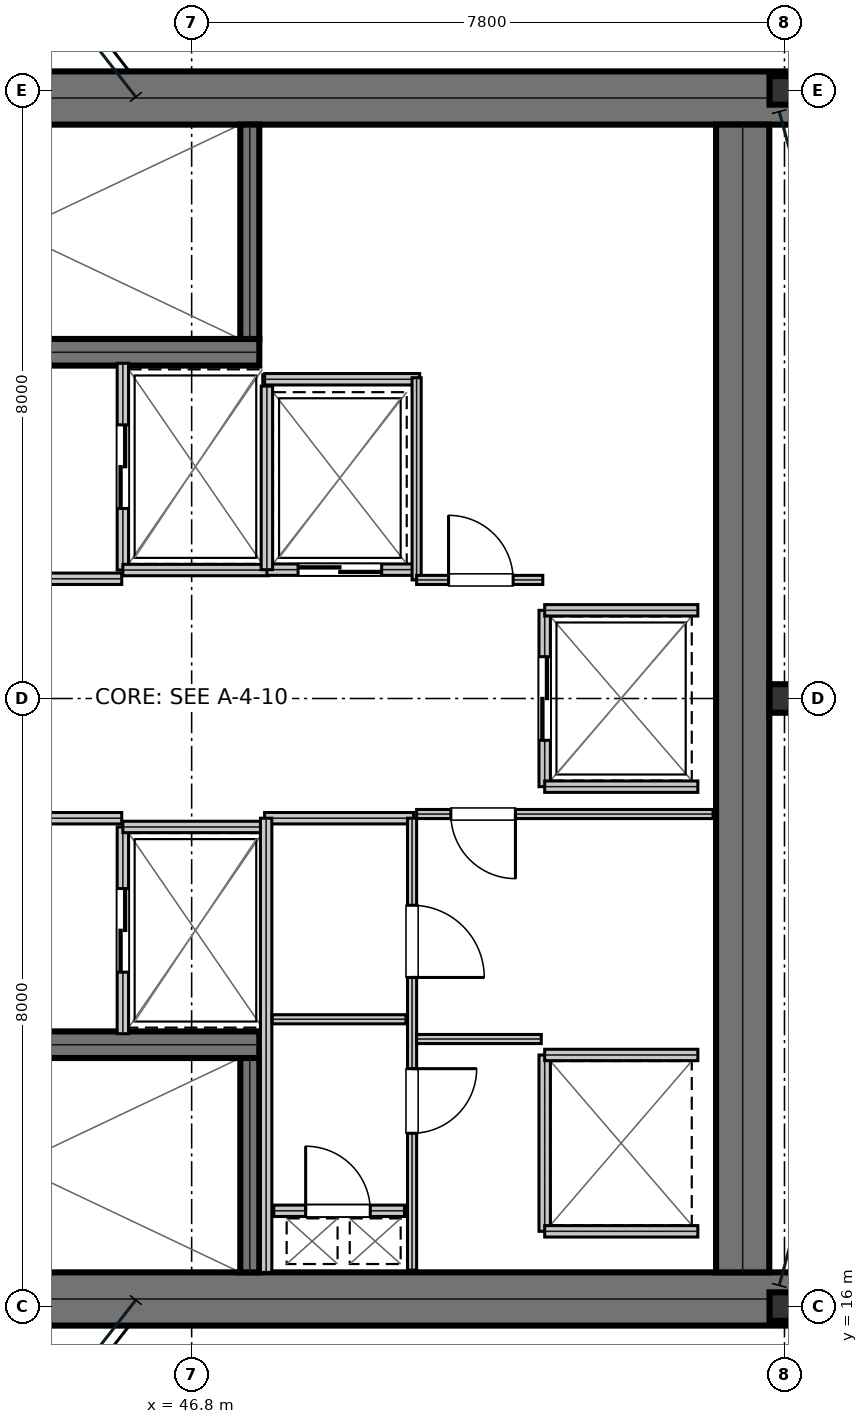
"""IFC4 building model, lengths in metres.
Left out: names, types, materials, properties, quantities, classifications, styles, units other than length and angle.
Written with IfcOpenShell. Run it as: python <this file> out.ifc"""

import sys

from ifc_helpers import new_model, si_unit, direction, frame, frame_2d, origin, origin_2d, place, context, subcontext, project, spatial, rectangle, i_section, extrude, element, fill, save


model = new_model("IFC4")
c1 = context("Model", 3, precision=1e-05, world=origin(), true_north=direction((0.0, 1.0)))
c2 = subcontext(c1, "Body", "Model", "MODEL_VIEW")
j1 = project(units=[si_unit("LENGTHUNIT", "METRE"), si_unit("PLANEANGLEUNIT", "RADIAN")], contexts=[c1])
p1 = place(None, origin())
s1 = spatial("IfcSite", under=j1, at=p1, CompositionType="ELEMENT")
p2 = place(p1, origin())
s2 = spatial("IfcBuilding", under=s1, at=p2, CompositionType="ELEMENT")
p3 = place(p2, frame((0.0, 0.0, 248.55)))
s3 = spatial("IfcBuildingStorey", under=s2, at=p3, CompositionType="ELEMENT", Elevation=248.55)
for number, where, z_axis, x_axis in (
    (1, (38.8, 31.9, 0.0), (0.0, 0.0, 1.0), (1.0, 0.0, 0.0)),
    (2, (38.8, 16.1, 0.0), (0.0, 0.0, 1.0), (1.0, 0.0, 0.0)),
):
    element("IfcWall", number, at=place(p3, frame(where, z_axis=z_axis, x_axis=x_axis)), inside=s3, PredefinedType="SHEAR", context=c2, shape_type="SweptSolid", body=[
        extrude(rectangle(XDim=16.0, YDim=0.7, at=frame_2d((8.0, 0.0))), origin(), (0.0, 0.0, 1.0), 3.79),
    ])
p4 = place(p3, frame((54.05, 16.45, 0.0), z_axis=(0.0, 0.0, 1.0), x_axis=(0.0, 1.0, 0.0)))
e3 = element("IfcWall", 3, at=p4, inside=s3, PredefinedType="SHEAR", context=c2, shape_type="SweptSolid", body=[
    extrude(rectangle(XDim=15.1, YDim=0.7, at=frame_2d((7.55, 0.0))), origin(), (0.0, 0.0, 1.0), 3.79),
])
p5 = place(p3, frame((39.98, 28.555, 0.0), z_axis=(0.0, 0.0, 1.0), x_axis=(1.0, 0.0, 0.0)))
e4 = element("IfcWall", 4, at=p5, inside=s3, PredefinedType="SHEAR", context=c2, shape_type="SweptSolid", body=[
    extrude(rectangle(XDim=7.71, YDim=0.35, at=frame_2d((3.855, 0.0))), origin(), (0.0, 0.0, 1.0), 3.79),
])
p6 = place(p5, frame((0.25, 0.0, 0.0)))
e5 = element("IfcOpeningElement", 5, at=p6, cuts=e4, PredefinedType="OPENING", context=c2, shape_type="SweptSolid", body=[
    extrude(rectangle(XDim=1.1, YDim=2.15, at=frame_2d((0.55, 1.075))), frame((0.0, 0.185, 0.0), z_axis=(0.0, -1.0, 0.0), x_axis=(1.0, 0.0, 0.0)), (0.0, 0.0, 1.0), 0.37),
])
p7 = place(p3, frame((39.98, 19.445, 0.0), z_axis=(0.0, 0.0, 1.0), x_axis=(1.0, 0.0, 0.0)))
e6 = element("IfcWall", 6, at=p7, inside=s3, PredefinedType="SHEAR", context=c2, shape_type="SweptSolid", body=[
    extrude(rectangle(XDim=7.71, YDim=0.35, at=frame_2d((3.855, 0.0))), origin(), (0.0, 0.0, 1.0), 3.79),
])
p8 = place(p7, frame((0.25, 0.0, 0.0)))
e7 = element("IfcOpeningElement", 7, at=p8, cuts=e6, PredefinedType="OPENING", context=c2, shape_type="SweptSolid", body=[
    extrude(rectangle(XDim=1.1, YDim=2.15, at=frame_2d((0.55, 1.075))), frame((0.0, 0.185, 0.0), z_axis=(0.0, -1.0, 0.0), x_axis=(1.0, 0.0, 0.0)), (0.0, 0.0, 1.0), 0.37),
])
for number, where, z_axis, x_axis in (
    (8, (47.565, 28.73, 0.0), (0.0, 0.0, 1.0), (0.0, 1.0, 0.0)),
    (9, (47.565, 16.45, 0.0), (0.0, 0.0, 1.0), (0.0, 1.0, 0.0)),
):
    element("IfcWall", number, at=place(p3, frame(where, z_axis=z_axis, x_axis=x_axis)), inside=s3, PredefinedType="SHEAR", context=c2, shape_type="SweptSolid", body=[
        extrude(rectangle(XDim=2.82, YDim=0.25, at=frame_2d((1.41, 0.0))), origin(), (0.0, 0.0, 1.0), 3.79),
    ])
for number, where, z_axis, x_axis in (
    (10, (54.6, 16.0, 0.0), (0.0, 0.0, 1.0), (1.0, 0.0, 0.0)),
    (11, (54.6, 24.0, 0.0), (0.0, 0.0, 1.0), (1.0, 0.0, 0.0)),
    (12, (54.6, 32.0, 0.0), (0.0, 0.0, 1.0), (1.0, 0.0, 0.0)),
):
    element("IfcColumn", number, at=place(p3, frame(where, z_axis=z_axis, x_axis=x_axis)), inside=s3, PredefinedType="COLUMN", context=c2, shape_type="SweptSolid", body=[
        extrude(i_section(OverallWidth=0.394, OverallDepth=0.375, WebThickness=0.017, FlangeThickness=0.028, at=origin_2d()), origin(), (0.0, 0.0, 1.0), 4.044),
    ])
p9 = place(p3, frame((39.98, 25.575, 0.0), z_axis=(0.0, 0.0, 1.0), x_axis=(1.0, 0.0, 0.0)))
e13 = element("IfcWall", 13, at=p9, inside=s3, PredefinedType="PARTITIONING", context=c2, shape_type="SweptSolid", body=[
    extrude(rectangle(XDim=5.9, YDim=0.15, at=frame_2d((2.95, 0.0))), origin(), (0.0, 0.0, 1.0), 3.79),
])
p10 = place(p9, frame((2.35, 0.0, 0.0)))
e14 = element("IfcOpeningElement", 14, at=p10, cuts=e13, PredefinedType="OPENING", context=c2, shape_type="SweptSolid", body=[
    extrude(rectangle(XDim=1.05, YDim=2.15, at=frame_2d((0.525, 1.075))), frame((0.0, 0.085, 0.0), z_axis=(0.0, -1.0, 0.0), x_axis=(1.0, 0.0, 0.0)), (0.0, 0.0, 1.0), 0.17),
])
p11 = place(p3, frame((39.98, 22.425, 0.0), z_axis=(0.0, 0.0, 1.0), x_axis=(1.0, 0.0, 0.0)))
e15 = element("IfcWall", 15, at=p11, inside=s3, PredefinedType="PARTITIONING", context=c2, shape_type="SweptSolid", body=[
    extrude(rectangle(XDim=5.9, YDim=0.15, at=frame_2d((2.95, 0.0))), origin(), (0.0, 0.0, 1.0), 3.79),
])
p12 = place(p11, frame((2.35, 0.0, 0.0)))
e16 = element("IfcOpeningElement", 16, at=p12, cuts=e15, PredefinedType="OPENING", context=c2, shape_type="SweptSolid", body=[
    extrude(rectangle(XDim=1.05, YDim=2.15, at=frame_2d((0.525, 1.075))), frame((0.0, 0.085, 0.0), z_axis=(0.0, -1.0, 0.0), x_axis=(1.0, 0.0, 0.0)), (0.0, 0.0, 1.0), 0.17),
])
p13 = place(p3, frame((45.895, 25.69, 0.0), z_axis=(0.0, 0.0, 1.0), x_axis=(0.0, 1.0, 0.0)))
e17 = element("IfcWall", 17, at=p13, inside=s3, PredefinedType="PARTITIONING", context=c2, shape_type="SweptSolid", body=[
    extrude(rectangle(XDim=2.72, YDim=0.15, at=frame_2d((1.36, 0.0))), origin(), (0.0, 0.0, 1.0), 3.79),
])
p14 = place(p13, frame((0.81, 0.0, 0.0)))
e18 = element("IfcOpeningElement", 18, at=p14, cuts=e17, PredefinedType="OPENING", context=c2, shape_type="SweptSolid", body=[
    extrude(rectangle(XDim=1.1, YDim=2.15, at=frame_2d((0.55, 1.075))), frame((0.0, 0.085, 0.0), z_axis=(0.0, -1.0, 0.0), x_axis=(1.0, 0.0, 0.0)), (0.0, 0.0, 1.0), 0.17),
])
p15 = place(p3, frame((45.895, 25.69, 0.0), z_axis=(0.0, 0.0, 1.0), x_axis=(1.0, 0.0, 0.0)))
e19 = element("IfcWall", 19, at=p15, inside=s3, PredefinedType="PARTITIONING", context=c2, shape_type="SweptSolid", body=[
    extrude(rectangle(XDim=1.915, YDim=0.15, at=frame_2d((0.958, 0.0))), origin(), (0.0, 0.0, 1.0), 3.79),
])
p16 = place(p3, frame((45.895, 19.59, 0.0), z_axis=(0.0, 0.0, 1.0), x_axis=(0.0, 1.0, 0.0)))
e20 = element("IfcWall", 20, at=p16, inside=s3, PredefinedType="PARTITIONING", context=c2, shape_type="SweptSolid", body=[
    extrude(rectangle(XDim=2.72, YDim=0.15, at=frame_2d((1.36, 0.0))), origin(), (0.0, 0.0, 1.0), 3.79),
])
p17 = place(p16, frame((0.81, 0.0, 0.0)))
e21 = element("IfcOpeningElement", 21, at=p17, cuts=e20, PredefinedType="OPENING", context=c2, shape_type="SweptSolid", body=[
    extrude(rectangle(XDim=1.1, YDim=2.15, at=frame_2d((0.55, 1.075))), frame((0.0, 0.085, 0.0), z_axis=(0.0, -1.0, 0.0), x_axis=(1.0, 0.0, 0.0)), (0.0, 0.0, 1.0), 0.17),
])
p18 = place(p3, frame((45.895, 22.31, 0.0), z_axis=(0.0, 0.0, 1.0), x_axis=(1.0, 0.0, 0.0)))
e22 = element("IfcWall", 22, at=p18, inside=s3, PredefinedType="PARTITIONING", context=c2, shape_type="SweptSolid", body=[
    extrude(rectangle(XDim=1.915, YDim=0.15, at=frame_2d((0.958, 0.0))), origin(), (0.0, 0.0, 1.0), 3.79),
])
p19 = place(p3, frame((47.79, 25.695, 0.0), z_axis=(0.0, 0.0, 1.0), x_axis=(1.0, 0.0, 0.0)))
e23 = element("IfcWall", 23, at=p19, inside=s3, PredefinedType="PARTITIONING", context=c2, shape_type="SweptSolid", body=[
    extrude(rectangle(XDim=1.92, YDim=0.15, at=frame_2d((0.96, 0.0))), origin(), (0.0, 0.0, 1.0), 3.79),
])
p20 = place(p19, frame((0.41, 0.0, 0.0)))
e24 = element("IfcOpeningElement", 24, at=p20, cuts=e23, PredefinedType="OPENING", context=c2, shape_type="SweptSolid", body=[
    extrude(rectangle(XDim=1.1, YDim=2.15, at=frame_2d((0.55, 1.075))), frame((0.0, 0.085, 0.0), z_axis=(0.0, -1.0, 0.0), x_axis=(1.0, 0.0, 0.0)), (0.0, 0.0, 1.0), 0.17),
])
p21 = place(p3, frame((47.79, 25.695, 0.0), z_axis=(0.0, 0.0, 1.0), x_axis=(0.0, 1.0, 0.0)))
e25 = element("IfcWall", 25, at=p21, inside=s3, PredefinedType="PARTITIONING", context=c2, shape_type="SweptSolid", body=[
    extrude(rectangle(XDim=2.415, YDim=0.15, at=frame_2d((1.208, 0.0))), origin(), (0.0, 0.0, 1.0), 3.79),
])
p22 = place(p3, frame((51.445, 22.84, 0.0), z_axis=(0.0, 0.0, 1.0), x_axis=(0.0, 1.0, 0.0)))
e26 = element("IfcWall", 26, at=p22, inside=s3, PredefinedType="PARTITIONING", context=c2, shape_type="SweptSolid", body=[
    extrude(rectangle(XDim=2.32, YDim=0.15, at=frame_2d((1.16, 0.0))), origin(), (0.0, 0.0, 1.0), 3.79),
])
p23 = place(p22, frame((0.61, 0.0, 0.0)))
e27 = element("IfcOpeningElement", 27, at=p23, cuts=e26, PredefinedType="OPENING", context=c2, shape_type="SweptSolid", body=[
    extrude(rectangle(XDim=1.1, YDim=2.15, at=frame_2d((0.55, 1.075))), frame((0.0, 0.085, 0.0), z_axis=(0.0, -1.0, 0.0), x_axis=(1.0, 0.0, 0.0)), (0.0, 0.0, 1.0), 0.17),
])
for number, where, z_axis, x_axis in (
    (28, (51.445, 22.84, 0.0), (0.0, 0.0, 1.0), (1.0, 0.0, 0.0)),
    (29, (51.445, 25.16, 0.0), (0.0, 0.0, 1.0), (1.0, 0.0, 0.0)),
):
    element("IfcWall", number, at=place(p3, frame(where, z_axis=z_axis, x_axis=x_axis)), inside=s3, PredefinedType="PARTITIONING", context=c2, shape_type="SweptSolid", body=[
        extrude(rectangle(XDim=2.015, YDim=0.15, at=frame_2d((1.007, 0.0))), origin(), (0.0, 0.0, 1.0), 3.79),
    ])
p24 = place(p3, frame((51.445, 16.99, 0.0), z_axis=(0.0, 0.0, 1.0), x_axis=(0.0, 1.0, 0.0)))
e30 = element("IfcWall", 30, at=p24, inside=s3, PredefinedType="PARTITIONING", context=c2, shape_type="SweptSolid", body=[
    extrude(rectangle(XDim=2.32, YDim=0.15, at=frame_2d((1.16, 0.0))), origin(), (0.0, 0.0, 1.0), 3.79),
])
for number, where, z_axis, x_axis in (
    (31, (51.445, 16.99, 0.0), (0.0, 0.0, 1.0), (1.0, 0.0, 0.0)),
    (32, (51.445, 19.31, 0.0), (0.0, 0.0, 1.0), (1.0, 0.0, 0.0)),
):
    element("IfcWall", number, at=place(p3, frame(where, z_axis=z_axis, x_axis=x_axis)), inside=s3, PredefinedType="PARTITIONING", context=c2, shape_type="SweptSolid", body=[
        extrude(rectangle(XDim=2.015, YDim=0.15, at=frame_2d((1.007, 0.0))), origin(), (0.0, 0.0, 1.0), 3.79),
    ])
p25 = place(p3, frame((47.88, 17.26, 0.0), z_axis=(0.0, 0.0, 1.0), x_axis=(1.0, 0.0, 0.0)))
e33 = element("IfcWall", 33, at=p25, inside=s3, PredefinedType="PARTITIONING", context=c2, shape_type="SweptSolid", body=[
    extrude(rectangle(XDim=1.72, YDim=0.15, at=frame_2d((0.86, 0.0))), origin(), (0.0, 0.0, 1.0), 3.79),
])
p26 = place(p25, frame((0.42, 0.0, 0.0)))
e34 = element("IfcOpeningElement", 34, at=p26, cuts=e33, PredefinedType="OPENING", context=c2, shape_type="SweptSolid", body=[
    extrude(rectangle(XDim=0.85, YDim=2.15, at=frame_2d((0.425, 1.075))), frame((0.0, 0.085, 0.0), z_axis=(0.0, -1.0, 0.0), x_axis=(1.0, 0.0, 0.0)), (0.0, 0.0, 1.0), 0.17),
])
p27 = place(p3, frame((47.76, 22.425, 0.0), z_axis=(0.0, 0.0, 1.0), x_axis=(1.0, 0.0, 0.0)))
e35 = element("IfcWall", 35, at=p27, inside=s3, PredefinedType="PARTITIONING", context=c2, shape_type="SweptSolid", body=[
    extrude(rectangle(XDim=1.96, YDim=0.15, at=frame_2d((0.98, 0.0))), origin(), (0.0, 0.0, 1.0), 3.79),
])
p28 = place(p3, frame((47.78, 16.45, 0.0), z_axis=(0.0, 0.0, 1.0), x_axis=(0.0, 1.0, 0.0)))
e36 = element("IfcWall", 36, at=p28, inside=s3, PredefinedType="PARTITIONING", context=c2, shape_type="SweptSolid", body=[
    extrude(rectangle(XDim=5.975, YDim=0.15, at=frame_2d((2.988, 0.0))), origin(), (0.0, 0.0, 1.0), 3.79),
])
p29 = place(p3, frame((47.86, 19.78, 0.0), z_axis=(0.0, 0.0, 1.0), x_axis=(1.0, 0.0, 0.0)))
e37 = element("IfcWall", 37, at=p29, inside=s3, PredefinedType="PARTITIONING", context=c2, shape_type="SweptSolid", body=[
    extrude(rectangle(XDim=1.76, YDim=0.12, at=frame_2d((0.88, 0.0))), origin(), (0.0, 0.0, 1.0), 3.79),
])
p30 = place(p3, frame((49.7, 16.48, 0.0), z_axis=(0.0, 0.0, 1.0), x_axis=(0.0, 1.0, 0.0)))
e38 = element("IfcWall", 38, at=p30, inside=s3, PredefinedType="PARTITIONING", context=c2, shape_type="SweptSolid", body=[
    extrude(rectangle(XDim=5.945, YDim=0.12, at=frame_2d((2.973, 0.0))), origin(), (0.0, 0.0, 1.0), 3.79),
])
p31 = place(p30, frame((1.8, 0.0, 0.0)))
e39 = element("IfcOpeningElement", 39, at=p31, cuts=e38, PredefinedType="OPENING", context=c2, shape_type="SweptSolid", body=[
    extrude(rectangle(XDim=0.85, YDim=2.15, at=frame_2d((0.425, 1.075))), frame((0.0, 0.07, 0.0), z_axis=(0.0, -1.0, 0.0), x_axis=(1.0, 0.0, 0.0)), (0.0, 0.0, 1.0), 0.14),
])
p32 = place(p30, frame((3.85, 0.0, 0.0)))
e40 = element("IfcOpeningElement", 40, at=p32, cuts=e38, PredefinedType="OPENING", context=c2, shape_type="SweptSolid", body=[
    extrude(rectangle(XDim=0.95, YDim=2.15, at=frame_2d((0.475, 1.075))), frame((0.0, 0.07, 0.0), z_axis=(0.0, -1.0, 0.0), x_axis=(1.0, 0.0, 0.0)), (0.0, 0.0, 1.0), 0.14),
])
p33 = place(p3, frame((49.76, 22.48, 0.0), z_axis=(0.0, 0.0, 1.0), x_axis=(1.0, 0.0, 0.0)))
e41 = element("IfcWall", 41, at=p33, inside=s3, PredefinedType="PARTITIONING", context=c2, shape_type="SweptSolid", body=[
    extrude(rectangle(XDim=3.9, YDim=0.12, at=frame_2d((1.95, 0.0))), origin(), (0.0, 0.0, 1.0), 3.79),
])
p34 = place(p33, frame((0.45, 0.0, 0.0)))
e42 = element("IfcOpeningElement", 42, at=p34, cuts=e41, PredefinedType="OPENING", context=c2, shape_type="SweptSolid", body=[
    extrude(rectangle(XDim=0.85, YDim=2.15, at=frame_2d((0.425, 1.075))), frame((0.0, 0.07, 0.0), z_axis=(0.0, -1.0, 0.0), x_axis=(1.0, 0.0, 0.0)), (0.0, 0.0, 1.0), 0.14),
])
p35 = place(p3, frame((49.76, 19.52, 0.0), z_axis=(0.0, 0.0, 1.0), x_axis=(1.0, 0.0, 0.0)))
e43 = element("IfcWall", 43, at=p35, inside=s3, PredefinedType="PARTITIONING", context=c2, shape_type="SweptSolid", body=[
    extrude(rectangle(XDim=1.64, YDim=0.12, at=frame_2d((0.82, 0.0))), origin(), (0.0, 0.0, 1.0), 3.79),
])
p36 = place(p3, frame((47.76, 28.2, 0.0), z_axis=(0.0, 0.0, 1.0), x_axis=(1.0, 0.0, 0.0)))
e44 = element("IfcWall", 44, at=p36, inside=s3, PredefinedType="PARTITIONING", context=c2, shape_type="SweptSolid", body=[
    extrude(rectangle(XDim=2.04, YDim=0.15, at=frame_2d((1.02, 0.0))), origin(), (0.0, 0.0, 1.0), 3.79),
])
p37 = place(p3, frame((49.76, 25.56, 0.0), z_axis=(0.0, 0.0, 1.0), x_axis=(0.0, 1.0, 0.0)))
e45 = element("IfcWall", 45, at=p37, inside=s3, PredefinedType="PARTITIONING", context=c2, shape_type="SweptSolid", body=[
    extrude(rectangle(XDim=2.66, YDim=0.12, at=frame_2d((1.33, 0.0))), origin(), (0.0, 0.0, 1.0), 3.79),
])
p38 = place(p3, frame((49.76, 25.56, 0.0), z_axis=(0.0, 0.0, 1.0), x_axis=(1.0, 0.0, 0.0)))
e46 = element("IfcWall", 46, at=p38, inside=s3, PredefinedType="PARTITIONING", context=c2, shape_type="SweptSolid", body=[
    extrude(rectangle(XDim=1.66, YDim=0.12, at=frame_2d((0.83, 0.0))), origin(), (0.0, 0.0, 1.0), 3.79),
])
p39 = place(p38, frame((0.42, 0.0, 0.0)))
e47 = element("IfcOpeningElement", 47, at=p39, cuts=e46, PredefinedType="OPENING", context=c2, shape_type="SweptSolid", body=[
    extrude(rectangle(XDim=0.85, YDim=2.15, at=frame_2d((0.425, 1.075))), frame((0.0, 0.07, 0.0), z_axis=(0.0, -1.0, 0.0), x_axis=(1.0, 0.0, 0.0)), (0.0, 0.0, 1.0), 0.14),
])
p40 = place(p14, frame((1.1, 0.0, 0.0), z_axis=(0.0, 0.0, 1.0), x_axis=(-1.0, 0.0, 0.0)))
e48 = element("IfcDoor", 48, at=p40, inside=s3, OperationType="DOUBLE_DOOR_SLIDING", PredefinedType="DOOR", context=c2, shape_type="SweptSolid", body=[
    extrude(rectangle(XDim=1.1, YDim=2.15, at=frame_2d((0.55, 1.075))), frame((0.0, 0.025, 0.0), z_axis=(0.0, -1.0, 0.0), x_axis=(1.0, 0.0, 0.0)), (0.0, 0.0, 1.0), 0.05),
])
fill(e18, e48)
p41 = place(p17, frame((1.1, 0.0, 0.0), z_axis=(0.0, 0.0, 1.0), x_axis=(-1.0, 0.0, 0.0)))
e49 = element("IfcDoor", 49, at=p41, inside=s3, OperationType="DOUBLE_DOOR_SLIDING", PredefinedType="DOOR", context=c2, shape_type="SweptSolid", body=[
    extrude(rectangle(XDim=1.1, YDim=2.15, at=frame_2d((0.55, 1.075))), frame((0.0, 0.025, 0.0), z_axis=(0.0, -1.0, 0.0), x_axis=(1.0, 0.0, 0.0)), (0.0, 0.0, 1.0), 0.05),
])
fill(e21, e49)
p42 = place(p20, frame((1.1, 0.0, 0.0), z_axis=(0.0, 0.0, 1.0), x_axis=(-1.0, 0.0, 0.0)))
e50 = element("IfcDoor", 50, at=p42, inside=s3, OperationType="DOUBLE_DOOR_SLIDING", PredefinedType="DOOR", context=c2, shape_type="SweptSolid", body=[
    extrude(rectangle(XDim=1.1, YDim=2.15, at=frame_2d((0.55, 1.075))), frame((0.0, 0.025, 0.0), z_axis=(0.0, -1.0, 0.0), x_axis=(1.0, 0.0, 0.0)), (0.0, 0.0, 1.0), 0.05),
])
fill(e24, e50)
p43 = place(p23, frame((1.1, 0.0, 0.0), z_axis=(0.0, 0.0, 1.0), x_axis=(-1.0, 0.0, 0.0)))
e51 = element("IfcDoor", 51, at=p43, inside=s3, OperationType="DOUBLE_DOOR_SLIDING", PredefinedType="DOOR", context=c2, shape_type="SweptSolid", body=[
    extrude(rectangle(XDim=1.1, YDim=2.15, at=frame_2d((0.55, 1.075))), frame((0.0, 0.025, 0.0), z_axis=(0.0, -1.0, 0.0), x_axis=(1.0, 0.0, 0.0)), (0.0, 0.0, 1.0), 0.05),
])
fill(e27, e51)
p44 = place(p26, origin())
e52 = element("IfcDoor", 52, at=p44, inside=s3, OperationType="SINGLE_SWING_LEFT", PredefinedType="TRAPDOOR", context=c2, shape_type="SweptSolid", body=[
    extrude(rectangle(XDim=0.85, YDim=2.15, at=frame_2d((0.425, 1.075))), frame((0.0, 0.025, 0.0), z_axis=(0.0, -1.0, 0.0), x_axis=(1.0, 0.0, 0.0)), (0.0, 0.0, 1.0), 0.05),
])
fill(e34, e52)
p45 = place(p31, frame((0.85, 0.0, 0.0), z_axis=(0.0, 0.0, 1.0), x_axis=(-1.0, 0.0, 0.0)))
e53 = element("IfcDoor", 53, at=p45, inside=s3, OperationType="SINGLE_SWING_LEFT", PredefinedType="DOOR", context=c2, shape_type="SweptSolid", body=[
    extrude(rectangle(XDim=0.85, YDim=2.15, at=frame_2d((0.425, 1.075))), frame((0.0, 0.025, 0.0), z_axis=(0.0, -1.0, 0.0), x_axis=(1.0, 0.0, 0.0)), (0.0, 0.0, 1.0), 0.05),
])
fill(e39, e53)
p46 = place(p32, frame((0.95, 0.0, 0.0), z_axis=(0.0, 0.0, 1.0), x_axis=(-1.0, 0.0, 0.0)))
e54 = element("IfcDoor", 54, at=p46, inside=s3, OperationType="SINGLE_SWING_RIGHT", PredefinedType="DOOR", context=c2, shape_type="SweptSolid", body=[
    extrude(rectangle(XDim=0.95, YDim=2.15, at=frame_2d((0.475, 1.075))), frame((0.0, 0.025, 0.0), z_axis=(0.0, -1.0, 0.0), x_axis=(1.0, 0.0, 0.0)), (0.0, 0.0, 1.0), 0.05),
])
fill(e40, e54)
p47 = place(p34, frame((0.85, 0.0, 0.0), z_axis=(0.0, 0.0, 1.0), x_axis=(-1.0, 0.0, 0.0)))
e55 = element("IfcDoor", 55, at=p47, inside=s3, OperationType="SINGLE_SWING_LEFT", PredefinedType="DOOR", context=c2, shape_type="SweptSolid", body=[
    extrude(rectangle(XDim=0.85, YDim=2.15, at=frame_2d((0.425, 1.075))), frame((0.0, 0.025, 0.0), z_axis=(0.0, -1.0, 0.0), x_axis=(1.0, 0.0, 0.0)), (0.0, 0.0, 1.0), 0.05),
])
fill(e42, e55)
p48 = place(p39, origin())
e56 = element("IfcDoor", 56, at=p48, inside=s3, OperationType="SINGLE_SWING_LEFT", PredefinedType="DOOR", context=c2, shape_type="SweptSolid", body=[
    extrude(rectangle(XDim=0.85, YDim=2.15, at=frame_2d((0.425, 1.075))), frame((0.0, 0.025, 0.0), z_axis=(0.0, -1.0, 0.0), x_axis=(1.0, 0.0, 0.0)), (0.0, 0.0, 1.0), 0.05),
])
fill(e47, e56)
save(model, sys.argv[1])
